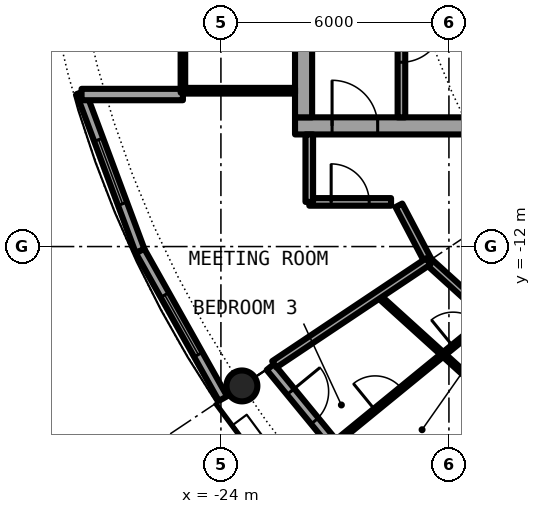
"""IFC4 building model, lengths in metres.
Left out: names, types, materials, properties, quantities, classifications, styles, units other than length and angle.
Written with IfcOpenShell. Run it as: python <this file> out.ifc"""

import sys

from ifc_helpers import new_model, si_unit, direction, frame, frame_2d, origin, origin_2d, place, context, subcontext, project, spatial, rectangle, hollow_circle, extrude, element, fill, save


model = new_model("IFC4")
c1 = context("Model", 3, precision=1e-05, world=origin(), true_north=direction((0.0, 1.0)))
c2 = subcontext(c1, "Body", "Model", "MODEL_VIEW")
j1 = project(units=[si_unit("LENGTHUNIT", "METRE"), si_unit("PLANEANGLEUNIT", "RADIAN")], contexts=[c1])
p1 = place(None, origin())
s1 = spatial("IfcSite", under=j1, at=p1, CompositionType="ELEMENT")
p2 = place(p1, origin())
s2 = spatial("IfcBuilding", under=s1, at=p2, CompositionType="ELEMENT")
p3 = place(p2, frame((0.0, 0.0, 190.2)))
s3 = spatial("IfcBuildingStorey", under=s2, at=p3, CompositionType="ELEMENT", Elevation=190.2)
p4 = place(p3, frame((-23.448, -15.667, 0.0), z_axis=(0.0, 0.0, 1.0), x_axis=(1.0, 0.0, 0.0)))
e1 = element("IfcColumn", 1, at=p4, inside=s3, PredefinedType="COLUMN", context=c2, shape_type="SweptSolid", body=[
    extrude(hollow_circle(Radius=0.406, WallThickness=0.03, at=origin_2d()), origin(), (0.0, 0.0, 1.0), 3.05),
])
p5 = place(p3, frame((-22.699, -15.167, 0.0), z_axis=(0.0, 0.0, 1.0), x_axis=(0.634382322723, -0.773019449054, 0.0)))
e2 = element("IfcWall", 2, at=p5, inside=s3, PredefinedType="SOLIDWALL", context=c2, shape_type="SweptSolid", body=[
    extrude(rectangle(XDim=5.352, YDim=0.25, at=frame_2d((2.676, 0.0))), origin(), (0.0, 0.0, 1.0), 2.7),
])
p6 = place(p5, frame((0.841, 0.0, 0.0)))
e3 = element("IfcOpeningElement", 3, at=p6, cuts=e2, PredefinedType="OPENING", context=c2, shape_type="SweptSolid", body=[
    extrude(rectangle(XDim=1.0, YDim=2.2, at=frame_2d((0.5, 1.1))), frame((0.0, 0.135, 0.0), z_axis=(0.0, -1.0, 0.0), x_axis=(1.0, 0.0, 0.0)), (0.0, 0.0, 1.0), 0.27),
])
p7 = place(p5, frame((3.111, 0.0, 0.3)))
e4 = element("IfcOpeningElement", 4, at=p7, cuts=e2, PredefinedType="OPENING", context=c2, shape_type="SweptSolid", body=[
    extrude(rectangle(XDim=1.8, YDim=2.1, at=frame_2d((0.9, 1.05))), frame((0.0, 0.135, 0.0), z_axis=(0.0, -1.0, 0.0), x_axis=(1.0, 0.0, 0.0)), (0.0, 0.0, 1.0), 0.27),
])
p8 = place(p3, frame((-27.682, -7.945, 0.0), z_axis=(0.0, 0.0, 1.0), x_axis=(0.349247811493, -0.937030397675, 0.0)))
e5 = element("IfcWall", 5, at=p8, inside=s3, PredefinedType="SOLIDWALL", context=c2, shape_type="SweptSolid", body=[
    extrude(rectangle(XDim=4.452, YDim=0.25, at=frame_2d((2.226, 0.0))), origin(), (0.0, 0.0, 1.0), 2.7),
])
p9 = place(p8, frame((1.327, 0.0, 0.3)))
e6 = element("IfcOpeningElement", 6, at=p9, cuts=e5, PredefinedType="OPENING", context=c2, shape_type="SweptSolid", body=[
    extrude(rectangle(XDim=1.8, YDim=2.1, at=frame_2d((0.9, 1.05))), frame((0.0, 0.135, 0.0), z_axis=(0.0, -1.0, 0.0), x_axis=(1.0, 0.0, 0.0)), (0.0, 0.0, 1.0), 0.27),
])
p10 = place(p3, frame((-26.127, -12.117, 0.0), z_axis=(0.0, 0.0, 1.0), x_axis=(0.489696356642, -0.871893042919, 0.0)))
e7 = element("IfcWall", 7, at=p10, inside=s3, PredefinedType="SOLIDWALL", context=c2, shape_type="SweptSolid", body=[
    extrude(rectangle(XDim=4.454, YDim=0.25, at=frame_2d((2.227, 0.0))), origin(), (0.0, 0.0, 1.0), 2.7),
])
p11 = place(p10, frame((1.327, 0.0, 0.3)))
e8 = element("IfcOpeningElement", 8, at=p11, cuts=e7, PredefinedType="OPENING", context=c2, shape_type="SweptSolid", body=[
    extrude(rectangle(XDim=1.8, YDim=2.1, at=frame_2d((0.9, 1.05))), frame((0.0, 0.135, 0.0), z_axis=(0.0, -1.0, 0.0), x_axis=(1.0, 0.0, 0.0)), (0.0, 0.0, 1.0), 0.27),
])
p12 = place(p3, frame((-25.0, -8.0, 0.0), z_axis=(0.0, 0.0, 1.0), x_axis=(-1.0, 0.0, 0.0)))
e9 = element("IfcWall", 9, at=p12, inside=s3, PredefinedType="SOLIDWALL", context=c2, shape_type="SweptSolid", body=[
    extrude(rectangle(XDim=2.667, YDim=0.3, at=frame_2d((1.333, 0.0))), origin(), (0.0, 0.0, 1.0), 2.7),
])
p13 = place(p3, frame((-22.05, -8.825, 0.0), z_axis=(0.0, 0.0, 1.0), x_axis=(1.0, 0.0, 0.0)))
e10 = element("IfcWall", 10, at=p13, inside=s3, PredefinedType="SHEAR", context=c2, shape_type="SweptSolid", body=[
    extrude(rectangle(XDim=13.5, YDim=0.45, at=frame_2d((6.75, 0.0))), origin(), (0.0, 0.0, 1.0), 3.05),
])
p14 = place(p13, frame((0.975, 0.0, 0.0)))
e11 = element("IfcOpeningElement", 11, at=p14, cuts=e10, PredefinedType="OPENING", context=c2, shape_type="SweptSolid", body=[
    extrude(rectangle(XDim=1.2, YDim=2.3, at=frame_2d((0.6, 1.15))), frame((0.0, 0.235, 0.0), z_axis=(0.0, -1.0, 0.0), x_axis=(1.0, 0.0, 0.0)), (0.0, 0.0, 1.0), 0.47),
])
p15 = place(p3, frame((-21.825, -8.6, 0.0), z_axis=(0.0, 0.0, 1.0), x_axis=(0.0, 1.0, 0.0)))
e12 = element("IfcWall", 12, at=p15, inside=s3, PredefinedType="SHEAR", context=c2, shape_type="SweptSolid", body=[
    extrude(rectangle(XDim=17.2, YDim=0.45, at=frame_2d((8.6, 0.0))), origin(), (0.0, 0.0, 1.0), 3.05),
])
p16 = place(p15, frame((7.7, 0.0, 0.0)))
e13 = element("IfcOpeningElement", 13, at=p16, cuts=e12, PredefinedType="OPENING", context=c2, shape_type="SweptSolid", body=[
    extrude(rectangle(XDim=1.8, YDim=2.3, at=frame_2d((0.9, 1.15))), frame((0.0, 0.235, 0.0), z_axis=(0.0, -1.0, 0.0), x_axis=(1.0, 0.0, 0.0)), (0.0, 0.0, 1.0), 0.47),
])
p17 = place(p3, frame((-19.25, -1.575, 0.0), z_axis=(0.0, 0.0, 1.0), x_axis=(0.0, -1.0, 0.0)))
e14 = element("IfcWall", 14, at=p17, inside=s3, PredefinedType="SOLIDWALL", context=c2, shape_type="SweptSolid", body=[
    extrude(rectangle(XDim=7.025, YDim=0.2, at=frame_2d((3.513, 0.0))), origin(), (0.0, 0.0, 1.0), 2.7),
])
p18 = place(p17, frame((4.475, 0.0, 0.0)))
e15 = element("IfcOpeningElement", 15, at=p18, cuts=e14, PredefinedType="OPENING", context=c2, shape_type="SweptSolid", body=[
    extrude(rectangle(XDim=1.1, YDim=2.3, at=frame_2d((0.55, 1.15))), frame((0.0, 0.11, 0.0), z_axis=(0.0, -1.0, 0.0), x_axis=(1.0, 0.0, 0.0)), (0.0, 0.0, 1.0), 0.22),
])
p19 = place(p3, frame((-22.05, -7.9, 0.0), z_axis=(0.0, 0.0, 1.0), x_axis=(-1.0, 0.0, 0.0)))
e16 = element("IfcWall", 16, at=p19, inside=s3, PredefinedType="PARTITIONING", context=c2, shape_type="SweptSolid", body=[
    extrude(rectangle(XDim=2.89, YDim=0.15, at=frame_2d((1.445, 0.0))), origin(), (0.0, 0.0, 1.0), 2.7),
])
p20 = place(p3, frame((-25.0, 7.95, 0.0), z_axis=(0.0, 0.0, 1.0), x_axis=(0.0, -1.0, 0.0)))
e17 = element("IfcWall", 17, at=p20, inside=s3, PredefinedType="PARTITIONING", context=c2, shape_type="SweptSolid", body=[
    extrude(rectangle(XDim=15.9, YDim=0.12, at=frame_2d((7.95, 0.0))), origin(), (0.0, 0.0, 1.0), 2.7),
])
p21 = place(p20, frame((0.95, 0.0, 0.1)))
e18 = element("IfcOpeningElement", 18, at=p21, cuts=e17, PredefinedType="OPENING", context=c2, shape_type="SweptSolid", body=[
    extrude(rectangle(XDim=14.0, YDim=2.35, at=frame_2d((7.0, 1.175))), frame((0.0, 0.07, 0.0), z_axis=(0.0, -1.0, 0.0), x_axis=(1.0, 0.0, 0.0)), (0.0, 0.0, 1.0), 0.14),
])
p22 = place(p3, frame((-19.869, -13.284, 0.0), z_axis=(0.0, 0.0, 1.0), x_axis=(0.741104058203, -0.67139018083, 0.0)))
e19 = element("IfcWall", 19, at=p22, inside=s3, PredefinedType="PARTITIONING", context=c2, shape_type="SweptSolid", body=[
    extrude(rectangle(XDim=6.969, YDim=0.1, at=frame_2d((3.484, 0.0))), origin(), (0.0, 0.0, 1.0), 2.7),
])
p23 = place(p22, frame((3.028, 0.0, 0.0)))
e20 = element("IfcOpeningElement", 20, at=p23, cuts=e19, PredefinedType="OPENING", context=c2, shape_type="SweptSolid", body=[
    extrude(rectangle(XDim=0.9, YDim=2.3, at=frame_2d((0.45, 1.15))), frame((0.0, 0.06, 0.0), z_axis=(0.0, -1.0, 0.0), x_axis=(1.0, 0.0, 0.0)), (0.0, 0.0, 1.0), 0.12),
])
p24 = place(p3, frame((-19.317, -10.915, 0.0), z_axis=(0.0, 0.0, 1.0), x_axis=(0.465359652486, -0.885121683068, 0.0)))
e21 = element("IfcWall", 21, at=p24, inside=s3, PredefinedType="PARTITIONING", context=c2, shape_type="SweptSolid", body=[
    extrude(rectangle(XDim=1.665, YDim=0.2, at=frame_2d((0.833, 0.0))), origin(), (0.0, 0.0, 1.0), 2.7),
])
p25 = place(p3, frame((-18.542, -12.389, 0.0), z_axis=(0.0, 0.0, 1.0), x_axis=(0.74093897184, -0.671572363941, 0.0)))
e22 = element("IfcWall", 22, at=p25, inside=s3, PredefinedType="PARTITIONING", context=c2, shape_type="SweptSolid", body=[
    extrude(rectangle(XDim=10.84, YDim=0.2, at=frame_2d((5.42, 0.0))), origin(), (0.0, 0.0, 1.0), 2.7),
])
p26 = place(p25, frame((6.544, 0.0, 0.0)))
e23 = element("IfcOpeningElement", 23, at=p26, cuts=e22, PredefinedType="OPENING", context=c2, shape_type="SweptSolid", body=[
    extrude(rectangle(XDim=1.0, YDim=2.3, at=frame_2d((0.5, 1.15))), frame((0.0, 0.11, 0.0), z_axis=(0.0, -1.0, 0.0), x_axis=(1.0, 0.0, 0.0)), (0.0, 0.0, 1.0), 0.22),
])
p27 = place(p3, frame((-21.675, -10.825, 0.0), z_axis=(0.0, 0.0, 1.0), x_axis=(1.0, 0.0, 0.0)))
e24 = element("IfcWall", 24, at=p27, inside=s3, PredefinedType="PARTITIONING", context=c2, shape_type="SweptSolid", body=[
    extrude(rectangle(XDim=2.152, YDim=0.2, at=frame_2d((1.076, 0.0))), origin(), (0.0, 0.0, 1.0), 2.7),
])
p28 = place(p27, frame((0.576, 0.0, 0.0)))
e25 = element("IfcOpeningElement", 25, at=p28, cuts=e24, PredefinedType="OPENING", context=c2, shape_type="SweptSolid", body=[
    extrude(rectangle(XDim=1.0, YDim=2.3, at=frame_2d((0.5, 1.15))), frame((0.0, 0.11, 0.0), z_axis=(0.0, -1.0, 0.0), x_axis=(1.0, 0.0, 0.0)), (0.0, 0.0, 1.0), 0.22),
])
p29 = place(p3, frame((-22.595, -15.098, 0.0), z_axis=(0.0, 0.0, 1.0), x_axis=(0.831387096605, 0.55569370664, 0.0)))
e26 = element("IfcWall", 26, at=p29, inside=s3, PredefinedType="PARTITIONING", context=c2, shape_type="SweptSolid", body=[
    extrude(rectangle(XDim=4.875, YDim=0.2, at=frame_2d((2.438, 0.0))), origin(), (0.0, 0.0, 1.0), 2.7),
])
p30 = place(p3, frame((-21.04, -17.199, 0.0), z_axis=(0.0, 0.0, 1.0), x_axis=(0.774310172558, 0.632806255241, 0.0)))
e27 = element("IfcWall", 27, at=p30, inside=s3, PredefinedType="PARTITIONING", context=c2, shape_type="SweptSolid", body=[
    extrude(rectangle(XDim=5.3, YDim=0.1, at=frame_2d((2.65, 0.0))), origin(), (0.0, 0.0, 1.0), 2.7),
])
p31 = place(p30, frame((4.066, 0.0, 0.0)))
e28 = element("IfcOpeningElement", 28, at=p31, cuts=e27, PredefinedType="OPENING", context=c2, shape_type="SweptSolid", body=[
    extrude(rectangle(XDim=0.9, YDim=2.3, at=frame_2d((0.45, 1.15))), frame((0.0, 0.06, 0.0), z_axis=(0.0, -1.0, 0.0), x_axis=(1.0, 0.0, 0.0)), (0.0, 0.0, 1.0), 0.12),
])
p32 = place(p30, frame((1.416, 0.0, 0.0)))
e29 = element("IfcOpeningElement", 29, at=p32, cuts=e27, PredefinedType="OPENING", context=c2, shape_type="SweptSolid", body=[
    extrude(rectangle(XDim=0.9, YDim=2.3, at=frame_2d((0.45, 1.15))), frame((0.0, 0.06, 0.0), z_axis=(0.0, -1.0, 0.0), x_axis=(1.0, 0.0, 0.0)), (0.0, 0.0, 1.0), 0.12),
])
p33 = place(p3, frame((-19.231, -19.2, 0.0), z_axis=(0.0, 0.0, 1.0), x_axis=(0.707722727509, 0.706490297858, 0.0)))
e30 = element("IfcWall", 30, at=p33, inside=s3, PredefinedType="PARTITIONING", context=c2, shape_type="SweptSolid", body=[
    extrude(rectangle(XDim=3.962, YDim=0.1, at=frame_2d((1.981, 0.0))), origin(), (0.0, 0.0, 1.0), 2.7),
])
p34 = place(p3, frame((-21.675, -10.825, 0.0), z_axis=(0.0, 0.0, 1.0), x_axis=(0.0, 1.0, 0.0)))
e31 = element("IfcWall", 31, at=p34, inside=s3, PredefinedType="PARTITIONING", context=c2, shape_type="SweptSolid", body=[
    extrude(rectangle(XDim=1.775, YDim=0.2, at=frame_2d((0.887, 0.0))), origin(), (0.0, 0.0, 1.0), 2.7),
])
p35 = place(p6, origin())
e32 = element("IfcDoor", 32, at=p35, inside=s3, OperationType="SINGLE_SWING_LEFT", PredefinedType="DOOR", context=c2, shape_type="SweptSolid", body=[
    extrude(rectangle(XDim=1.0, YDim=2.2, at=frame_2d((0.5, 1.1))), frame((0.0, 0.025, 0.0), z_axis=(0.0, -1.0, 0.0), x_axis=(1.0, 0.0, 0.0)), (0.0, 0.0, 1.0), 0.05),
])
fill(e3, e32)
p36 = place(p9, origin())
e33 = element("IfcWindow", 33, at=p36, inside=s3, PartitioningType="SINGLE_PANEL", PredefinedType="WINDOW", context=c2, shape_type="SweptSolid", body=[
    extrude(rectangle(XDim=1.8, YDim=2.1, at=frame_2d((0.9, 1.05))), frame((0.0, 0.03, 0.0), z_axis=(0.0, -1.0, 0.0), x_axis=(1.0, 0.0, 0.0)), (0.0, 0.0, 1.0), 0.06),
])
fill(e6, e33)
p37 = place(p11, origin())
e34 = element("IfcWindow", 34, at=p37, inside=s3, PartitioningType="SINGLE_PANEL", PredefinedType="WINDOW", context=c2, shape_type="SweptSolid", body=[
    extrude(rectangle(XDim=1.8, YDim=2.1, at=frame_2d((0.9, 1.05))), frame((0.0, 0.03, 0.0), z_axis=(0.0, -1.0, 0.0), x_axis=(1.0, 0.0, 0.0)), (0.0, 0.0, 1.0), 0.06),
])
fill(e8, e34)
p38 = place(p18, origin())
e35 = element("IfcDoor", 35, at=p38, inside=s3, OperationType="SINGLE_SWING_LEFT", PredefinedType="DOOR", context=c2, shape_type="SweptSolid", body=[
    extrude(rectangle(XDim=1.1, YDim=2.3, at=frame_2d((0.55, 1.15))), frame((0.0, 0.025, 0.0), z_axis=(0.0, -1.0, 0.0), x_axis=(1.0, 0.0, 0.0)), (0.0, 0.0, 1.0), 0.05),
])
fill(e15, e35)
p39 = place(p14, origin())
e36 = element("IfcDoor", 36, at=p39, inside=s3, OperationType="SINGLE_SWING_RIGHT", PredefinedType="DOOR", context=c2, shape_type="SweptSolid", body=[
    extrude(rectangle(XDim=1.2, YDim=2.3, at=frame_2d((0.6, 1.15))), frame((0.0, 0.025, 0.0), z_axis=(0.0, -1.0, 0.0), x_axis=(1.0, 0.0, 0.0)), (0.0, 0.0, 1.0), 0.05),
])
fill(e11, e36)
p40 = place(p21, origin())
e37 = element("IfcWindow", 37, at=p40, inside=s3, PartitioningType="SINGLE_PANEL", PredefinedType="WINDOW", context=c2, shape_type="SweptSolid", body=[
    extrude(rectangle(XDim=14.0, YDim=2.35, at=frame_2d((7.0, 1.175))), frame((0.0, 0.03, 0.0), z_axis=(0.0, -1.0, 0.0), x_axis=(1.0, 0.0, 0.0)), (0.0, 0.0, 1.0), 0.06),
])
fill(e18, e37)
p41 = place(p31, origin())
e38 = element("IfcDoor", 38, at=p41, inside=s3, OperationType="SINGLE_SWING_RIGHT", PredefinedType="DOOR", context=c2, shape_type="SweptSolid", body=[
    extrude(rectangle(XDim=0.9, YDim=2.3, at=frame_2d((0.45, 1.15))), frame((0.0, 0.025, 0.0), z_axis=(0.0, -1.0, 0.0), x_axis=(1.0, 0.0, 0.0)), (0.0, 0.0, 1.0), 0.05),
])
fill(e28, e38)
p42 = place(p32, origin())
e39 = element("IfcDoor", 39, at=p42, inside=s3, OperationType="SINGLE_SWING_LEFT", PredefinedType="DOOR", context=c2, shape_type="SweptSolid", body=[
    extrude(rectangle(XDim=0.9, YDim=2.3, at=frame_2d((0.45, 1.15))), frame((0.0, 0.025, 0.0), z_axis=(0.0, -1.0, 0.0), x_axis=(1.0, 0.0, 0.0)), (0.0, 0.0, 1.0), 0.05),
])
fill(e29, e39)
p43 = place(p28, origin())
e40 = element("IfcDoor", 40, at=p43, inside=s3, OperationType="SINGLE_SWING_LEFT", PredefinedType="DOOR", context=c2, shape_type="SweptSolid", body=[
    extrude(rectangle(XDim=1.0, YDim=2.3, at=frame_2d((0.5, 1.15))), frame((0.0, 0.025, 0.0), z_axis=(0.0, -1.0, 0.0), x_axis=(1.0, 0.0, 0.0)), (0.0, 0.0, 1.0), 0.05),
])
fill(e25, e40)
save(model, sys.argv[1])
